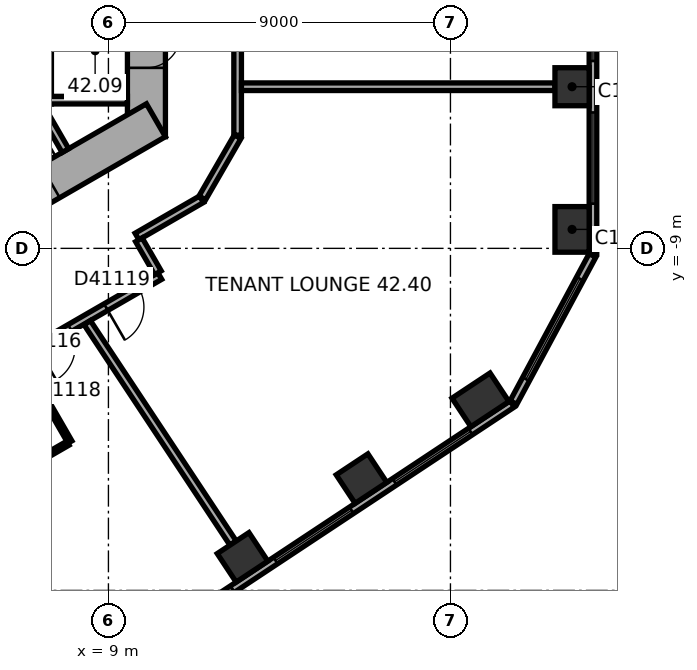
"""IFC4 building model, lengths in metres.
Left out: names, types, materials, properties, quantities, classifications, styles, units other than length and angle.
Written with IfcOpenShell. Run it as: python <this file> out.ifc"""

import sys

from ifc_helpers import new_model, si_unit, direction, frame, frame_2d, origin, origin_2d, place, context, subcontext, project, spatial, rectangle, extrude, element, fill, save


model = new_model("IFC4")
c1 = context("Model", 3, precision=1e-05, world=origin(), true_north=direction((0.0, 1.0)))
c2 = subcontext(c1, "Body", "Model", "MODEL_VIEW")
j1 = project(units=[si_unit("LENGTHUNIT", "METRE"), si_unit("PLANEANGLEUNIT", "RADIAN")], contexts=[c1])
p1 = place(None, origin())
s1 = spatial("IfcSite", under=j1, at=p1, CompositionType="ELEMENT")
p2 = place(p1, origin())
s2 = spatial("IfcBuilding", under=s1, at=p2, CompositionType="ELEMENT")
p3 = place(p2, frame((0.0, 0.0, 172.5)))
s3 = spatial("IfcBuildingStorey", under=s2, at=p3, CompositionType="ELEMENT", Elevation=172.5)
p4 = place(p3, frame((21.2, -8.501, 0.0), z_axis=(0.0, 0.0, 1.0), x_axis=(0.0, 1.0, 0.0)))
e1 = element("IfcColumn", 1, at=p4, inside=s3, PredefinedType="COLUMN", context=c2, shape_type="SweptSolid", body=[
    extrude(rectangle(XDim=1.2, YDim=0.9, at=origin_2d()), origin(), (0.0, 0.0, 1.0), 3.7),
])
for number, where, z_axis, x_axis in (
    (2, (21.2, -4.747, 0.0), (0.0, 0.0, 1.0), (0.0, 1.0, 0.0)),
    (3, (12.529, -17.13, 0.0), (0.0, 0.0, 1.0), (0.834, 0.552, 0.0)),
    (4, (15.659, -15.058, 0.0), (0.0, 0.0, 1.0), (0.834, 0.552, 0.0)),
):
    element("IfcColumn", number, at=place(p3, frame(where, z_axis=z_axis, x_axis=x_axis)), inside=s3, PredefinedType="COLUMN", context=c2, shape_type="SweptSolid", body=[
        extrude(rectangle(XDim=1.0, YDim=0.9, at=origin_2d()), origin(), (0.0, 0.0, 1.0), 3.7),
    ])
p5 = place(p3, frame((18.79, -12.986, 0.0), z_axis=(0.0, 0.0, 1.0), x_axis=(0.833885822067, 0.551936985312, 0.0)))
e5 = element("IfcColumn", 5, at=p5, inside=s3, PredefinedType="COLUMN", context=c2, shape_type="SweptSolid", body=[
    extrude(rectangle(XDim=1.2, YDim=0.9, at=origin_2d()), origin(), (0.0, 0.0, 1.0), 3.7),
])
p6 = place(p3, frame((10.0, -6.062, 0.0), z_axis=(0.0, 0.0, 1.0), x_axis=(0.0, 1.0, 0.0)))
e6 = element("IfcWall", 6, at=p6, inside=s3, PredefinedType="SHEAR", context=c2, shape_type="SweptSolid", body=[
    extrude(rectangle(XDim=12.125, YDim=1.0, at=frame_2d((6.062, 0.0))), origin(), (0.0, 0.0, 1.0), 3.7),
])
p7 = place(p6, frame((6.262, 0.0, 0.0)))
e7 = element("IfcOpeningElement", 7, at=p7, cuts=e6, PredefinedType="OPENING", context=c2, shape_type="SweptSolid", body=[
    extrude(rectangle(XDim=1.5, YDim=2.1, at=frame_2d((0.75, 1.05))), frame((0.0, 0.51, 0.0), z_axis=(0.0, -1.0, 0.0), x_axis=(1.0, 0.0, 0.0)), (0.0, 0.0, 1.0), 1.02),
])
p8 = place(p6, frame((1.812, 0.0, 0.0)))
e8 = element("IfcOpeningElement", 8, at=p8, cuts=e6, PredefinedType="OPENING", context=c2, shape_type="SweptSolid", body=[
    extrude(rectangle(XDim=0.9, YDim=2.1, at=frame_2d((0.45, 1.05))), frame((0.0, 0.51, 0.0), z_axis=(0.0, -1.0, 0.0), x_axis=(1.0, 0.0, 0.0)), (0.0, 0.0, 1.0), 1.02),
])
p9 = place(p6, frame((4.412, 0.0, 0.0)))
e9 = element("IfcOpeningElement", 9, at=p9, cuts=e6, PredefinedType="OPENING", context=c2, shape_type="SweptSolid", body=[
    extrude(rectangle(XDim=0.9, YDim=2.1, at=frame_2d((0.45, 1.05))), frame((0.0, 0.51, 0.0), z_axis=(0.0, -1.0, 0.0), x_axis=(1.0, 0.0, 0.0)), (0.0, 0.0, 1.0), 1.02),
])
p10 = place(p3, frame((-0.25, -11.691, 0.0), z_axis=(0.0, 0.0, 1.0), x_axis=(0.866022616891, 0.50000482701, 0.0)))
e10 = element("IfcWall", 10, at=p10, inside=s3, PredefinedType="SHEAR", context=c2, shape_type="SweptSolid", body=[
    extrude(rectangle(XDim=12.125, YDim=1.0, at=frame_2d((6.062, 0.0))), origin(), (0.0, 0.0, 1.0), 3.7),
])
p11 = place(p10, frame((2.612, 0.0, 0.0)))
e11 = element("IfcOpeningElement", 11, at=p11, cuts=e10, PredefinedType="OPENING", context=c2, shape_type="SweptSolid", body=[
    extrude(rectangle(XDim=1.1, YDim=2.1, at=frame_2d((0.55, 1.05))), frame((0.0, 0.51, 0.0), z_axis=(0.0, -1.0, 0.0), x_axis=(1.0, 0.0, 0.0)), (0.0, 0.0, 1.0), 1.02),
])
p12 = place(p10, frame((5.212, 0.0, 0.0)))
e12 = element("IfcOpeningElement", 12, at=p12, cuts=e10, PredefinedType="OPENING", context=c2, shape_type="SweptSolid", body=[
    extrude(rectangle(XDim=1.1, YDim=2.1, at=frame_2d((0.55, 1.05))), frame((0.0, 0.51, 0.0), z_axis=(0.0, -1.0, 0.0), x_axis=(1.0, 0.0, 0.0)), (0.0, 0.0, 1.0), 1.02),
])
p13 = place(p10, frame((7.812, 0.0, 0.0)))
e13 = element("IfcOpeningElement", 13, at=p13, cuts=e10, PredefinedType="OPENING", context=c2, shape_type="SweptSolid", body=[
    extrude(rectangle(XDim=1.1, YDim=2.1, at=frame_2d((0.55, 1.05))), frame((0.0, 0.51, 0.0), z_axis=(0.0, -1.0, 0.0), x_axis=(1.0, 0.0, 0.0)), (0.0, 0.0, 1.0), 1.02),
])
p14 = place(p3, frame((21.75, -9.138, 0.0), z_axis=(0.0, 0.0, 1.0), x_axis=(0.0, 1.0, 0.0)))
e14 = element("IfcWall", 14, at=p14, inside=s3, PredefinedType="STANDARD", context=c2, shape_type="SweptSolid", body=[
    extrude(rectangle(XDim=20.044, YDim=0.2, at=frame_2d((10.022, 0.0))), origin(), (0.0, 0.0, 1.0), 3.7),
])
p15 = place(p14, frame((1.314, 0.0, 0.9)))
e15 = element("IfcOpeningElement", 15, at=p15, cuts=e14, PredefinedType="OPENING", context=c2, shape_type="SweptSolid", body=[
    extrude(rectangle(XDim=2.4, YDim=2.0, at=frame_2d((1.2, 1.0))), frame((0.0, 0.11, 0.0), z_axis=(0.0, -1.0, 0.0), x_axis=(1.0, 0.0, 0.0)), (0.0, 0.0, 1.0), 0.22),
])
p16 = place(p14, frame((5.069, 0.0, 0.9)))
e16 = element("IfcOpeningElement", 16, at=p16, cuts=e14, PredefinedType="OPENING", context=c2, shape_type="SweptSolid", body=[
    extrude(rectangle(XDim=2.4, YDim=2.0, at=frame_2d((1.2, 1.0))), frame((0.0, 0.11, 0.0), z_axis=(0.0, -1.0, 0.0), x_axis=(1.0, 0.0, 0.0)), (0.0, 0.0, 1.0), 0.22),
])
p17 = place(p14, frame((8.823, 0.0, 0.9)))
e17 = element("IfcOpeningElement", 17, at=p17, cuts=e14, PredefinedType="OPENING", context=c2, shape_type="SweptSolid", body=[
    extrude(rectangle(XDim=2.4, YDim=2.0, at=frame_2d((1.2, 1.0))), frame((0.0, 0.11, 0.0), z_axis=(0.0, -1.0, 0.0), x_axis=(1.0, 0.0, 0.0)), (0.0, 0.0, 1.0), 0.22),
])
p18 = place(p14, frame((12.577, 0.0, 0.9)))
e18 = element("IfcOpeningElement", 18, at=p18, cuts=e14, PredefinedType="OPENING", context=c2, shape_type="SweptSolid", body=[
    extrude(rectangle(XDim=2.4, YDim=2.0, at=frame_2d((1.2, 1.0))), frame((0.0, 0.11, 0.0), z_axis=(0.0, -1.0, 0.0), x_axis=(1.0, 0.0, 0.0)), (0.0, 0.0, 1.0), 0.22),
])
p19 = place(p14, frame((16.331, 0.0, 0.9)))
e19 = element("IfcOpeningElement", 19, at=p19, cuts=e14, PredefinedType="OPENING", context=c2, shape_type="SweptSolid", body=[
    extrude(rectangle(XDim=2.4, YDim=2.0, at=frame_2d((1.2, 1.0))), frame((0.0, 0.11, 0.0), z_axis=(0.0, -1.0, 0.0), x_axis=(1.0, 0.0, 0.0)), (0.0, 0.0, 1.0), 0.22),
])
p20 = place(p3, frame((2.911, -24.156, 0.0), z_axis=(0.0, 0.0, 1.0), x_axis=(0.833882163564, 0.551942512668, 0.0)))
e20 = element("IfcWall", 20, at=p20, inside=s3, PredefinedType="STANDARD", context=c2, shape_type="SweptSolid", body=[
    extrude(rectangle(XDim=20.044, YDim=0.2, at=frame_2d((10.022, 0.0))), origin(), (0.0, 0.0, 1.0), 3.7),
])
p21 = place(p20, frame((1.313, 0.0, 0.9)))
e21 = element("IfcOpeningElement", 21, at=p21, cuts=e20, PredefinedType="OPENING", context=c2, shape_type="SweptSolid", body=[
    extrude(rectangle(XDim=2.4, YDim=2.0, at=frame_2d((1.2, 1.0))), frame((0.0, 0.11, 0.0), z_axis=(0.0, -1.0, 0.0), x_axis=(1.0, 0.0, 0.0)), (0.0, 0.0, 1.0), 0.22),
])
p22 = place(p20, frame((5.067, 0.0, 0.9)))
e22 = element("IfcOpeningElement", 22, at=p22, cuts=e20, PredefinedType="OPENING", context=c2, shape_type="SweptSolid", body=[
    extrude(rectangle(XDim=2.4, YDim=2.0, at=frame_2d((1.2, 1.0))), frame((0.0, 0.11, 0.0), z_axis=(0.0, -1.0, 0.0), x_axis=(1.0, 0.0, 0.0)), (0.0, 0.0, 1.0), 0.22),
])
p23 = place(p20, frame((8.821, 0.0, 0.9)))
e23 = element("IfcOpeningElement", 23, at=p23, cuts=e20, PredefinedType="OPENING", context=c2, shape_type="SweptSolid", body=[
    extrude(rectangle(XDim=2.4, YDim=2.0, at=frame_2d((1.2, 1.0))), frame((0.0, 0.11, 0.0), z_axis=(0.0, -1.0, 0.0), x_axis=(1.0, 0.0, 0.0)), (0.0, 0.0, 1.0), 0.22),
])
p24 = place(p20, frame((12.575, 0.0, 0.9)))
e24 = element("IfcOpeningElement", 24, at=p24, cuts=e20, PredefinedType="OPENING", context=c2, shape_type="SweptSolid", body=[
    extrude(rectangle(XDim=2.4, YDim=2.0, at=frame_2d((1.2, 1.0))), frame((0.0, 0.11, 0.0), z_axis=(0.0, -1.0, 0.0), x_axis=(1.0, 0.0, 0.0)), (0.0, 0.0, 1.0), 0.22),
])
p25 = place(p20, frame((16.329, 0.0, 0.9)))
e25 = element("IfcOpeningElement", 25, at=p25, cuts=e20, PredefinedType="OPENING", context=c2, shape_type="SweptSolid", body=[
    extrude(rectangle(XDim=2.4, YDim=2.0, at=frame_2d((1.2, 1.0))), frame((0.0, 0.11, 0.0), z_axis=(0.0, -1.0, 0.0), x_axis=(1.0, 0.0, 0.0)), (0.0, 0.0, 1.0), 0.22),
])
p26 = place(p3, frame((19.658, -13.057, 0.0), z_axis=(0.0, 0.0, 1.0), x_axis=(0.473307879841, 0.880897071672, 0.0)))
e26 = element("IfcWall", 26, at=p26, inside=s3, PredefinedType="STANDARD", context=c2, shape_type="SweptSolid", body=[
    extrude(rectangle(XDim=4.395, YDim=0.2, at=frame_2d((2.197, 0.0))), origin(), (0.0, 0.0, 1.0), 3.7),
])
p27 = place(p26, frame((0.698, 0.0, 0.9)))
e27 = element("IfcOpeningElement", 27, at=p27, cuts=e26, PredefinedType="OPENING", context=c2, shape_type="SweptSolid", body=[
    extrude(rectangle(XDim=3.0, YDim=2.0, at=frame_2d((1.5, 1.0))), frame((0.0, 0.11, 0.0), z_axis=(0.0, -1.0, 0.0), x_axis=(1.0, 0.0, 0.0)), (0.0, 0.0, 1.0), 0.22),
])
for number, where, z_axis, x_axis in (
    (28, (7.3, -5.1, 0.0), (0.0, 0.0, 1.0), (1.0, 0.0, 0.0)),
    (29, (6.768, -4.522, 0.0), (0.0, 0.0, 1.0), (0.5, -0.866, 0.0)),
):
    element("IfcWall", number, at=place(p3, frame(where, z_axis=z_axis, x_axis=x_axis)), inside=s3, PredefinedType="PARTITIONING", context=c2, shape_type="SweptSolid", body=[
        extrude(rectangle(XDim=2.2, YDim=0.2, at=frame_2d((1.1, 0.0))), origin(), (0.0, 0.0, 1.0), 3.42),
    ])
p28 = place(p3, frame((4.782, -12.944, 0.0), z_axis=(0.0, 0.0, 1.0), x_axis=(0.866022506829, 0.50000501764, 0.0)))
e30 = element("IfcWall", 30, at=p28, inside=s3, PredefinedType="PARTITIONING", context=c2, shape_type="SweptSolid", body=[
    extrude(rectangle(XDim=6.432, YDim=0.2, at=frame_2d((3.216, 0.0))), origin(), (0.0, 0.0, 1.0), 3.42),
])
p29 = place(p28, frame((2.704, 0.0, 0.0)))
e31 = element("IfcOpeningElement", 31, at=p29, cuts=e30, PredefinedType="OPENING", context=c2, shape_type="SweptSolid", body=[
    extrude(rectangle(XDim=1.0, YDim=2.1, at=frame_2d((0.5, 1.05))), frame((0.0, 0.11, 0.0), z_axis=(0.0, -1.0, 0.0), x_axis=(1.0, 0.0, 0.0)), (0.0, 0.0, 1.0), 0.22),
])
p30 = place(p28, frame((4.795, 0.0, 0.0)))
e32 = element("IfcOpeningElement", 32, at=p30, cuts=e30, PredefinedType="OPENING", context=c2, shape_type="SweptSolid", body=[
    extrude(rectangle(XDim=1.0, YDim=2.1, at=frame_2d((0.5, 1.05))), frame((0.0, 0.11, 0.0), z_axis=(0.0, -1.0, 0.0), x_axis=(1.0, 0.0, 0.0)), (0.0, 0.0, 1.0), 0.22),
])
p31 = place(p3, frame((6.737, -11.931, 0.0), z_axis=(0.0, 0.0, 1.0), x_axis=(0.500004234368, -0.866022959057, 0.0)))
e33 = element("IfcWall", 33, at=p31, inside=s3, PredefinedType="PARTITIONING", context=c2, shape_type="SweptSolid", body=[
    extrude(rectangle(XDim=2.5, YDim=0.12, at=frame_2d((1.25, 0.0))), origin(), (0.0, 0.0, 1.0), 3.42),
])
p32 = place(p31, frame((0.8, 0.0, 0.0)))
e34 = element("IfcOpeningElement", 34, at=p32, cuts=e33, PredefinedType="OPENING", context=c2, shape_type="SweptSolid", body=[
    extrude(rectangle(XDim=0.9, YDim=2.1, at=frame_2d((0.45, 1.05))), frame((0.0, 0.07, 0.0), z_axis=(0.0, -1.0, 0.0), x_axis=(1.0, 0.0, 0.0)), (0.0, 0.0, 1.0), 0.14),
])
p33 = place(p3, frame((7.935, -14.126, 0.0), z_axis=(0.0, 0.0, 1.0), x_axis=(-0.866009661879, -0.500027264788, 0.0)))
e35 = element("IfcWall", 35, at=p33, inside=s3, PredefinedType="PARTITIONING", context=c2, shape_type="SweptSolid", body=[
    extrude(rectangle(XDim=2.08, YDim=0.12, at=frame_2d((1.04, 0.0))), origin(), (0.0, 0.0, 1.0), 3.42),
])
p34 = place(p3, frame((9.752, -8.688, 0.0), z_axis=(0.0, 0.0, 1.0), x_axis=(0.865974105138, 0.500088841337, 0.0)))
e36 = element("IfcWall", 36, at=p34, inside=s3, PredefinedType="PARTITIONING", context=c2, shape_type="SweptSolid", body=[
    extrude(rectangle(XDim=1.961, YDim=0.2, at=frame_2d((0.98, 0.0))), origin(), (0.0, 0.0, 1.0), 3.42),
])
p35 = place(p3, frame((10.302, -9.642, 0.0), z_axis=(0.0, 0.0, 1.0), x_axis=(-0.500074377092, 0.865982457891, 0.0)))
e37 = element("IfcWall", 37, at=p35, inside=s3, PredefinedType="PARTITIONING", context=c2, shape_type="SweptSolid", body=[
    extrude(rectangle(XDim=1.001, YDim=0.2, at=frame_2d((0.5, 0.0))), origin(), (0.0, 0.0, 1.0), 3.42),
])
p36 = place(p3, frame((11.47, -7.673, 0.0), z_axis=(0.0, 0.0, 1.0), x_axis=(0.499964847546, 0.866045698112, 0.0)))
e38 = element("IfcWall", 38, at=p36, inside=s3, PredefinedType="PARTITIONING", context=c2, shape_type="SweptSolid", body=[
    extrude(rectangle(XDim=1.86, YDim=0.2, at=frame_2d((0.93, 0.0))), origin(), (0.0, 0.0, 1.0), 3.42),
])
p37 = place(p3, frame((12.281, -16.755, 0.0), z_axis=(0.0, 0.0, 1.0), x_axis=(-0.551925794663, 0.833893228888, 0.0)))
e39 = element("IfcWall", 39, at=p37, inside=s3, PredefinedType="PARTITIONING", context=c2, shape_type="SweptSolid", body=[
    extrude(rectangle(XDim=6.953, YDim=0.2, at=frame_2d((3.476, 0.0))), origin(), (0.0, 0.0, 1.0), 3.42),
])
p38 = place(p3, frame((12.4, -6.022, 0.0), z_axis=(0.0, 0.0, 1.0), x_axis=(0.0, 1.0, 0.0)))
e40 = element("IfcWall", 40, at=p38, inside=s3, PredefinedType="PARTITIONING", context=c2, shape_type="SweptSolid", body=[
    extrude(rectangle(XDim=5.029, YDim=0.2, at=frame_2d((2.515, 0.0))), origin(), (0.0, 0.0, 1.0), 3.42),
])
p39 = place(p3, frame((20.75, -4.747, 0.0), z_axis=(0.0, 0.0, 1.0), x_axis=(-1.0, 0.0, 0.0)))
e41 = element("IfcWall", 41, at=p39, inside=s3, PredefinedType="PARTITIONING", context=c2, shape_type="SweptSolid", body=[
    extrude(rectangle(XDim=8.25, YDim=0.2, at=frame_2d((4.125, 0.0))), origin(), (0.0, 0.0, 1.0), 3.42),
])
p40 = place(p15, origin())
e42 = element("IfcWindow", 42, at=p40, inside=s3, PartitioningType="SINGLE_PANEL", PredefinedType="WINDOW", context=c2, shape_type="SweptSolid", body=[
    extrude(rectangle(XDim=2.4, YDim=2.0, at=frame_2d((1.2, 1.0))), frame((0.0, 0.03, 0.0), z_axis=(0.0, -1.0, 0.0), x_axis=(1.0, 0.0, 0.0)), (0.0, 0.0, 1.0), 0.06),
])
fill(e15, e42)
p41 = place(p16, origin())
e43 = element("IfcWindow", 43, at=p41, inside=s3, PartitioningType="SINGLE_PANEL", PredefinedType="WINDOW", context=c2, shape_type="SweptSolid", body=[
    extrude(rectangle(XDim=2.4, YDim=2.0, at=frame_2d((1.2, 1.0))), frame((0.0, 0.03, 0.0), z_axis=(0.0, -1.0, 0.0), x_axis=(1.0, 0.0, 0.0)), (0.0, 0.0, 1.0), 0.06),
])
fill(e16, e43)
p42 = place(p23, origin())
e44 = element("IfcWindow", 44, at=p42, inside=s3, PartitioningType="SINGLE_PANEL", PredefinedType="WINDOW", context=c2, shape_type="SweptSolid", body=[
    extrude(rectangle(XDim=2.4, YDim=2.0, at=frame_2d((1.2, 1.0))), frame((0.0, 0.03, 0.0), z_axis=(0.0, -1.0, 0.0), x_axis=(1.0, 0.0, 0.0)), (0.0, 0.0, 1.0), 0.06),
])
fill(e23, e44)
p43 = place(p24, origin())
e45 = element("IfcWindow", 45, at=p43, inside=s3, PartitioningType="SINGLE_PANEL", PredefinedType="WINDOW", context=c2, shape_type="SweptSolid", body=[
    extrude(rectangle(XDim=2.4, YDim=2.0, at=frame_2d((1.2, 1.0))), frame((0.0, 0.03, 0.0), z_axis=(0.0, -1.0, 0.0), x_axis=(1.0, 0.0, 0.0)), (0.0, 0.0, 1.0), 0.06),
])
fill(e24, e45)
p44 = place(p25, origin())
e46 = element("IfcWindow", 46, at=p44, inside=s3, PartitioningType="SINGLE_PANEL", PredefinedType="WINDOW", context=c2, shape_type="SweptSolid", body=[
    extrude(rectangle(XDim=2.4, YDim=2.0, at=frame_2d((1.2, 1.0))), frame((0.0, 0.03, 0.0), z_axis=(0.0, -1.0, 0.0), x_axis=(1.0, 0.0, 0.0)), (0.0, 0.0, 1.0), 0.06),
])
fill(e25, e46)
p45 = place(p27, origin())
e47 = element("IfcWindow", 47, at=p45, inside=s3, PartitioningType="SINGLE_PANEL", PredefinedType="WINDOW", context=c2, shape_type="SweptSolid", body=[
    extrude(rectangle(XDim=3.0, YDim=2.0, at=frame_2d((1.5, 1.0))), frame((0.0, 0.03, 0.0), z_axis=(0.0, -1.0, 0.0), x_axis=(1.0, 0.0, 0.0)), (0.0, 0.0, 1.0), 0.06),
])
fill(e27, e47)
p46 = place(p8, origin())
e48 = element("IfcDoor", 48, at=p46, inside=s3, OperationType="SINGLE_SWING_LEFT", PredefinedType="DOOR", context=c2, shape_type="SweptSolid", body=[
    extrude(rectangle(XDim=0.9, YDim=2.1, at=frame_2d((0.45, 1.05))), frame((0.0, 0.025, 0.0), z_axis=(0.0, -1.0, 0.0), x_axis=(1.0, 0.0, 0.0)), (0.0, 0.0, 1.0), 0.05),
])
fill(e8, e48)
p47 = place(p29, origin())
e49 = element("IfcDoor", 49, at=p47, inside=s3, OperationType="SINGLE_SWING_LEFT", PredefinedType="DOOR", context=c2, shape_type="SweptSolid", body=[
    extrude(rectangle(XDim=1.0, YDim=2.1, at=frame_2d((0.5, 1.05))), frame((0.0, 0.025, 0.0), z_axis=(0.0, -1.0, 0.0), x_axis=(1.0, 0.0, 0.0)), (0.0, 0.0, 1.0), 0.05),
])
fill(e31, e49)
p48 = place(p32, origin())
e50 = element("IfcDoor", 50, at=p48, inside=s3, OperationType="SINGLE_SWING_LEFT", PredefinedType="DOOR", context=c2, shape_type="SweptSolid", body=[
    extrude(rectangle(XDim=0.9, YDim=2.1, at=frame_2d((0.45, 1.05))), frame((0.0, 0.025, 0.0), z_axis=(0.0, -1.0, 0.0), x_axis=(1.0, 0.0, 0.0)), (0.0, 0.0, 1.0), 0.05),
])
fill(e34, e50)
p49 = place(p30, origin())
e51 = element("IfcDoor", 51, at=p49, inside=s3, OperationType="SINGLE_SWING_LEFT", PredefinedType="DOOR", context=c2, shape_type="SweptSolid", body=[
    extrude(rectangle(XDim=1.0, YDim=2.1, at=frame_2d((0.5, 1.05))), frame((0.0, 0.025, 0.0), z_axis=(0.0, -1.0, 0.0), x_axis=(1.0, 0.0, 0.0)), (0.0, 0.0, 1.0), 0.05),
])
fill(e32, e51)
save(model, sys.argv[1])
